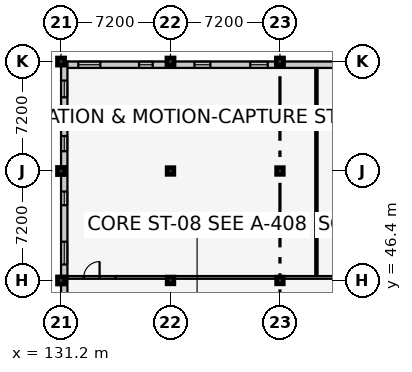
"""IFC4 building model, lengths in metres.
Left out: names, types, materials, properties, quantities, classifications, styles, units other than length and angle.
Written with IfcOpenShell. Run it as: python <this file> out.ifc"""

import sys

from ifc_helpers import new_model, si_unit, direction, frame, frame_2d, origin, origin_2d, place, context, subcontext, project, spatial, rectangle, extrude, element, fill, save


model = new_model("IFC4")
c1 = context("Model", 3, precision=1e-05, world=origin(), true_north=direction((0.0, 1.0)))
c2 = subcontext(c1, "Body", "Model", "MODEL_VIEW")
j1 = project(units=[si_unit("LENGTHUNIT", "METRE"), si_unit("PLANEANGLEUNIT", "RADIAN")], contexts=[c1])
p1 = place(None, origin())
s1 = spatial("IfcSite", under=j1, at=p1, CompositionType="ELEMENT")
p2 = place(p1, origin())
s2 = spatial("IfcBuilding", under=s1, at=p2, CompositionType="ELEMENT")
p3 = place(p2, frame((0.0, 0.0, 9.6)))
s3 = spatial("IfcBuildingStorey", under=s2, at=p3, CompositionType="ELEMENT", Elevation=9.6)
for number, where, z_axis, x_axis in (
    (1, (131.2, 46.4, 0.0), (0.0, 0.0, 1.0), (1.0, 0.0, 0.0)),
    (2, (131.2, 53.6, 0.0), (0.0, 0.0, 1.0), (1.0, 0.0, 0.0)),
    (3, (131.2, 60.8, 0.0), (0.0, 0.0, 1.0), (1.0, 0.0, 0.0)),
):
    element("IfcColumn", number, at=place(p3, frame(where, z_axis=z_axis, x_axis=x_axis)), inside=s3, PredefinedType="COLUMN", context=c2, shape_type="SweptSolid", body=[
        extrude(rectangle(XDim=0.48, YDim=0.48, at=origin_2d()), origin(), (0.0, 0.0, 1.0), 4.2),
    ])
for number, where, z_axis, x_axis in (
    (4, (138.4, 46.4, 0.0), (0.0, 0.0, 1.0), (1.0, 0.0, 0.0)),
    (5, (138.4, 53.6, 0.0), (0.0, 0.0, 1.0), (1.0, 0.0, 0.0)),
):
    element("IfcColumn", number, at=place(p3, frame(where, z_axis=z_axis, x_axis=x_axis)), inside=s3, PredefinedType="COLUMN", context=c2, shape_type="SweptSolid", body=[
        extrude(rectangle(XDim=0.45, YDim=0.45, at=origin_2d()), origin(), (0.0, 0.0, 1.0), 4.2),
    ])
p4 = place(p3, frame((138.4, 60.8, 0.0), z_axis=(0.0, 0.0, 1.0), x_axis=(1.0, 0.0, 0.0)))
e6 = element("IfcColumn", 6, at=p4, inside=s3, PredefinedType="COLUMN", context=c2, shape_type="SweptSolid", body=[
    extrude(rectangle(XDim=0.48, YDim=0.48, at=origin_2d()), origin(), (0.0, 0.0, 1.0), 4.2),
])
for number, where, z_axis, x_axis in (
    (7, (145.6, 46.4, 0.0), (0.0, 0.0, 1.0), (1.0, 0.0, 0.0)),
    (8, (145.6, 53.6, 0.0), (0.0, 0.0, 1.0), (1.0, 0.0, 0.0)),
):
    element("IfcColumn", number, at=place(p3, frame(where, z_axis=z_axis, x_axis=x_axis)), inside=s3, PredefinedType="COLUMN", context=c2, shape_type="SweptSolid", body=[
        extrude(rectangle(XDim=0.45, YDim=0.45, at=origin_2d()), origin(), (0.0, 0.0, 1.0), 4.2),
    ])
p5 = place(p3, frame((145.6, 60.8, 0.0), z_axis=(0.0, 0.0, 1.0), x_axis=(1.0, 0.0, 0.0)))
e9 = element("IfcColumn", 9, at=p5, inside=s3, PredefinedType="COLUMN", context=c2, shape_type="SweptSolid", body=[
    extrude(rectangle(XDim=0.48, YDim=0.48, at=origin_2d()), origin(), (0.0, 0.0, 1.0), 4.2),
])
p6 = place(p3, frame((131.2, 60.59, 0.0), z_axis=(0.0, 0.0, 1.0), x_axis=(1.0, 0.0, 0.0)))
e10 = element("IfcWall", 10, at=p6, inside=s3, PredefinedType="SOLIDWALL", context=c2, shape_type="SweptSolid", body=[
    extrude(rectangle(XDim=37.2, YDim=0.42, at=frame_2d((18.6, 0.0))), origin(), (0.0, 0.0, 1.0), 3.115),
])
p7 = place(p6, frame((1.135, 0.0, 0.9)))
e11 = element("IfcOpeningElement", 11, at=p7, cuts=e10, PredefinedType="OPENING", context=c2, shape_type="SweptSolid", body=[
    extrude(rectangle(XDim=1.45, YDim=1.45, at=frame_2d((0.725, 0.725))), frame((0.0, 0.222, 0.0), z_axis=(0.0, -1.0, 0.0), x_axis=(1.0, 0.0, 0.0)), (0.0, 0.0, 1.0), 0.444),
])
p8 = place(p6, frame((5.13, 0.0, 0.9)))
e12 = element("IfcOpeningElement", 12, at=p8, cuts=e10, PredefinedType="OPENING", context=c2, shape_type="SweptSolid", body=[
    extrude(rectangle(XDim=0.9, YDim=1.6, at=frame_2d((0.45, 0.8))), frame((0.0, 0.222, 0.0), z_axis=(0.0, -1.0, 0.0), x_axis=(1.0, 0.0, 0.0)), (0.0, 0.0, 1.0), 0.444),
])
p9 = place(p6, frame((8.775, 0.0, 0.9)))
e13 = element("IfcOpeningElement", 13, at=p9, cuts=e10, PredefinedType="OPENING", context=c2, shape_type="SweptSolid", body=[
    extrude(rectangle(XDim=1.05, YDim=1.6, at=frame_2d((0.525, 0.8))), frame((0.0, 0.222, 0.0), z_axis=(0.0, -1.0, 0.0), x_axis=(1.0, 0.0, 0.0)), (0.0, 0.0, 1.0), 0.444),
])
p10 = place(p6, frame((12.445, 0.0, 0.9)))
e14 = element("IfcOpeningElement", 14, at=p10, cuts=e10, PredefinedType="OPENING", context=c2, shape_type="SweptSolid", body=[
    extrude(rectangle(XDim=1.15, YDim=1.6, at=frame_2d((0.575, 0.8))), frame((0.0, 0.222, 0.0), z_axis=(0.0, -1.0, 0.0), x_axis=(1.0, 0.0, 0.0)), (0.0, 0.0, 1.0), 0.444),
])
p11 = place(p6, frame((23.43, 0.0, 0.9)))
e15 = element("IfcOpeningElement", 15, at=p11, cuts=e10, PredefinedType="OPENING", context=c2, shape_type="SweptSolid", body=[
    extrude(rectangle(XDim=1.5, YDim=1.6, at=frame_2d((0.75, 0.8))), frame((0.0, 0.222, 0.0), z_axis=(0.0, -1.0, 0.0), x_axis=(1.0, 0.0, 0.0)), (0.0, 0.0, 1.0), 0.444),
])
p12 = place(p6, frame((31.06, 0.0, 0.9)))
e16 = element("IfcOpeningElement", 16, at=p12, cuts=e10, PredefinedType="OPENING", context=c2, shape_type="SweptSolid", body=[
    extrude(rectangle(XDim=1.12, YDim=1.75, at=frame_2d((0.56, 0.875))), frame((0.0, 0.222, 0.0), z_axis=(0.0, -1.0, 0.0), x_axis=(1.0, 0.0, 0.0)), (0.0, 0.0, 1.0), 0.444),
])
p13 = place(p6, frame((34.72, 0.0, 0.9)))
e17 = element("IfcOpeningElement", 17, at=p13, cuts=e10, PredefinedType="OPENING", context=c2, shape_type="SweptSolid", body=[
    extrude(rectangle(XDim=1.24, YDim=1.75, at=frame_2d((0.62, 0.875))), frame((0.0, 0.222, 0.0), z_axis=(0.0, -1.0, 0.0), x_axis=(1.0, 0.0, 0.0)), (0.0, 0.0, 1.0), 0.444),
])
p14 = place(p3, frame((131.41, 39.2, 0.0), z_axis=(0.0, 0.0, 1.0), x_axis=(0.0, 1.0, 0.0)))
e18 = element("IfcWall", 18, at=p14, inside=s3, PredefinedType="SOLIDWALL", context=c2, shape_type="SweptSolid", body=[
    extrude(rectangle(XDim=21.6, YDim=0.42, at=frame_2d((10.8, 0.0))), origin(), (0.0, 0.0, 1.0), 3.355),
])
p15 = place(p14, frame((1.13, 0.0, 0.9)))
e19 = element("IfcOpeningElement", 19, at=p15, cuts=e18, PredefinedType="OPENING", context=c2, shape_type="SweptSolid", body=[
    extrude(rectangle(XDim=1.34, YDim=1.75, at=frame_2d((0.67, 0.875))), frame((0.0, 0.222, 0.0), z_axis=(0.0, -1.0, 0.0), x_axis=(1.0, 0.0, 0.0)), (0.0, 0.0, 1.0), 0.444),
])
p16 = place(p14, frame((4.68, 0.0, 0.9)))
e20 = element("IfcOpeningElement", 20, at=p16, cuts=e18, PredefinedType="OPENING", context=c2, shape_type="SweptSolid", body=[
    extrude(rectangle(XDim=1.44, YDim=1.75, at=frame_2d((0.72, 0.875))), frame((0.0, 0.222, 0.0), z_axis=(0.0, -1.0, 0.0), x_axis=(1.0, 0.0, 0.0)), (0.0, 0.0, 1.0), 0.444),
])
p17 = place(p14, frame((8.25, 0.0, 0.9)))
e21 = element("IfcOpeningElement", 21, at=p17, cuts=e18, PredefinedType="OPENING", context=c2, shape_type="SweptSolid", body=[
    extrude(rectangle(XDim=1.5, YDim=1.75, at=frame_2d((0.75, 0.875))), frame((0.0, 0.222, 0.0), z_axis=(0.0, -1.0, 0.0), x_axis=(1.0, 0.0, 0.0)), (0.0, 0.0, 1.0), 0.444),
])
p18 = place(p14, frame((12.15, 0.0, 0.9)))
e22 = element("IfcOpeningElement", 22, at=p18, cuts=e18, PredefinedType="OPENING", context=c2, shape_type="SweptSolid", body=[
    extrude(rectangle(XDim=0.9, YDim=1.35, at=frame_2d((0.45, 0.675))), frame((0.0, 0.222, 0.0), z_axis=(0.0, -1.0, 0.0), x_axis=(1.0, 0.0, 0.0)), (0.0, 0.0, 1.0), 0.444),
])
p19 = place(p14, frame((15.7, 0.0, 0.9)))
e23 = element("IfcOpeningElement", 23, at=p19, cuts=e18, PredefinedType="OPENING", context=c2, shape_type="SweptSolid", body=[
    extrude(rectangle(XDim=1.0, YDim=1.35, at=frame_2d((0.5, 0.675))), frame((0.0, 0.222, 0.0), z_axis=(0.0, -1.0, 0.0), x_axis=(1.0, 0.0, 0.0)), (0.0, 0.0, 1.0), 0.444),
])
p20 = place(p14, frame((19.25, 0.0, 0.9)))
e24 = element("IfcOpeningElement", 24, at=p20, cuts=e18, PredefinedType="OPENING", context=c2, shape_type="SweptSolid", body=[
    extrude(rectangle(XDim=1.1, YDim=1.35, at=frame_2d((0.55, 0.675))), frame((0.0, 0.222, 0.0), z_axis=(0.0, -1.0, 0.0), x_axis=(1.0, 0.0, 0.0)), (0.0, 0.0, 1.0), 0.444),
])
p21 = place(p3, frame((131.63, 46.6, 0.0), z_axis=(0.0, 0.0, 1.0), x_axis=(1.0, 0.0, 0.0)))
e25 = element("IfcWall", 25, at=p21, inside=s3, PredefinedType="PARTITIONING", context=c2, shape_type="SweptSolid", body=[
    extrude(rectangle(XDim=3.17, YDim=0.18, at=frame_2d((1.585, 0.0))), origin(), (0.0, 0.0, 1.0), 3.285),
])
p22 = place(p21, frame((1.065, 0.0, 0.0)))
e26 = element("IfcOpeningElement", 26, at=p22, cuts=e25, PredefinedType="OPENING", context=c2, shape_type="SweptSolid", body=[
    extrude(rectangle(XDim=1.04, YDim=2.15, at=frame_2d((0.52, 1.075))), frame((0.0, 0.102, 0.0), z_axis=(0.0, -1.0, 0.0), x_axis=(1.0, 0.0, 0.0)), (0.0, 0.0, 1.0), 0.204),
])
p23 = place(p3, frame((134.8, 46.6, 0.0), z_axis=(0.0, 0.0, 1.0), x_axis=(1.0, 0.0, 0.0)))
e27 = element("IfcWall", 27, at=p23, inside=s3, PredefinedType="PARTITIONING", context=c2, shape_type="SweptSolid", body=[
    extrude(rectangle(XDim=33.17, YDim=0.18, at=frame_2d((16.585, 0.0))), origin(), (0.0, 0.0, 1.0), 2.835),
])
p24 = place(p23, frame((22.675, 0.0, 0.0)))
e28 = element("IfcOpeningElement", 28, at=p24, cuts=e27, PredefinedType="OPENING", context=c2, shape_type="SweptSolid", body=[
    extrude(rectangle(XDim=1.02, YDim=2.12, at=frame_2d((0.51, 1.06))), frame((0.0, 0.102, 0.0), z_axis=(0.0, -1.0, 0.0), x_axis=(1.0, 0.0, 0.0)), (0.0, 0.0, 1.0), 0.204),
])
p25 = place(p3, frame((148.0, 46.7, 0.0), z_axis=(0.0, 0.0, 1.0), x_axis=(0.0, 1.0, 0.0)))
e29 = element("IfcWall", 29, at=p25, inside=s3, PredefinedType="PARTITIONING", context=c2, shape_type="SweptSolid", body=[
    extrude(rectangle(XDim=13.67, YDim=0.15, at=frame_2d((6.835, 0.0))), origin(), (0.0, 0.0, 1.0), 3.96),
])
p26 = place(p7, origin())
e30 = element("IfcWindow", 30, at=p26, inside=s3, PartitioningType="SINGLE_PANEL", PredefinedType="WINDOW", context=c2, shape_type="SweptSolid", body=[
    extrude(rectangle(XDim=1.45, YDim=1.45, at=frame_2d((0.725, 0.725))), frame((0.0, 0.03, 0.0), z_axis=(0.0, -1.0, 0.0), x_axis=(1.0, 0.0, 0.0)), (0.0, 0.0, 1.0), 0.06),
])
fill(e11, e30)
p27 = place(p8, origin())
e31 = element("IfcWindow", 31, at=p27, inside=s3, PartitioningType="SINGLE_PANEL", PredefinedType="WINDOW", context=c2, shape_type="SweptSolid", body=[
    extrude(rectangle(XDim=0.9, YDim=1.6, at=frame_2d((0.45, 0.8))), frame((0.0, 0.03, 0.0), z_axis=(0.0, -1.0, 0.0), x_axis=(1.0, 0.0, 0.0)), (0.0, 0.0, 1.0), 0.06),
])
fill(e12, e31)
p28 = place(p9, origin())
e32 = element("IfcWindow", 32, at=p28, inside=s3, PartitioningType="SINGLE_PANEL", PredefinedType="WINDOW", context=c2, shape_type="SweptSolid", body=[
    extrude(rectangle(XDim=1.05, YDim=1.6, at=frame_2d((0.525, 0.8))), frame((0.0, 0.03, 0.0), z_axis=(0.0, -1.0, 0.0), x_axis=(1.0, 0.0, 0.0)), (0.0, 0.0, 1.0), 0.06),
])
fill(e13, e32)
p29 = place(p10, origin())
e33 = element("IfcWindow", 33, at=p29, inside=s3, PartitioningType="SINGLE_PANEL", PredefinedType="WINDOW", context=c2, shape_type="SweptSolid", body=[
    extrude(rectangle(XDim=1.15, YDim=1.6, at=frame_2d((0.575, 0.8))), frame((0.0, 0.03, 0.0), z_axis=(0.0, -1.0, 0.0), x_axis=(1.0, 0.0, 0.0)), (0.0, 0.0, 1.0), 0.06),
])
fill(e14, e33)
p30 = place(p17, origin())
e34 = element("IfcWindow", 34, at=p30, inside=s3, PartitioningType="SINGLE_PANEL", PredefinedType="WINDOW", context=c2, shape_type="SweptSolid", body=[
    extrude(rectangle(XDim=1.5, YDim=1.75, at=frame_2d((0.75, 0.875))), frame((0.0, 0.03, 0.0), z_axis=(0.0, -1.0, 0.0), x_axis=(1.0, 0.0, 0.0)), (0.0, 0.0, 1.0), 0.06),
])
fill(e21, e34)
p31 = place(p18, origin())
e35 = element("IfcWindow", 35, at=p31, inside=s3, PartitioningType="SINGLE_PANEL", PredefinedType="WINDOW", context=c2, shape_type="SweptSolid", body=[
    extrude(rectangle(XDim=0.9, YDim=1.35, at=frame_2d((0.45, 0.675))), frame((0.0, 0.03, 0.0), z_axis=(0.0, -1.0, 0.0), x_axis=(1.0, 0.0, 0.0)), (0.0, 0.0, 1.0), 0.06),
])
fill(e22, e35)
p32 = place(p19, origin())
e36 = element("IfcWindow", 36, at=p32, inside=s3, PartitioningType="SINGLE_PANEL", PredefinedType="WINDOW", context=c2, shape_type="SweptSolid", body=[
    extrude(rectangle(XDim=1.0, YDim=1.35, at=frame_2d((0.5, 0.675))), frame((0.0, 0.03, 0.0), z_axis=(0.0, -1.0, 0.0), x_axis=(1.0, 0.0, 0.0)), (0.0, 0.0, 1.0), 0.06),
])
fill(e23, e36)
p33 = place(p20, origin())
e37 = element("IfcWindow", 37, at=p33, inside=s3, PartitioningType="SINGLE_PANEL", PredefinedType="WINDOW", context=c2, shape_type="SweptSolid", body=[
    extrude(rectangle(XDim=1.1, YDim=1.35, at=frame_2d((0.55, 0.675))), frame((0.0, 0.03, 0.0), z_axis=(0.0, -1.0, 0.0), x_axis=(1.0, 0.0, 0.0)), (0.0, 0.0, 1.0), 0.06),
])
fill(e24, e37)
p34 = place(p22, origin())
e38 = element("IfcDoor", 38, at=p34, inside=s3, OperationType="SINGLE_SWING_RIGHT", PredefinedType="DOOR", context=c2, shape_type="SweptSolid", body=[
    extrude(rectangle(XDim=1.04, YDim=2.15, at=frame_2d((0.52, 1.075))), frame((0.0, 0.025, 0.0), z_axis=(0.0, -1.0, 0.0), x_axis=(1.0, 0.0, 0.0)), (0.0, 0.0, 1.0), 0.05),
])
fill(e26, e38)
save(model, sys.argv[1])
